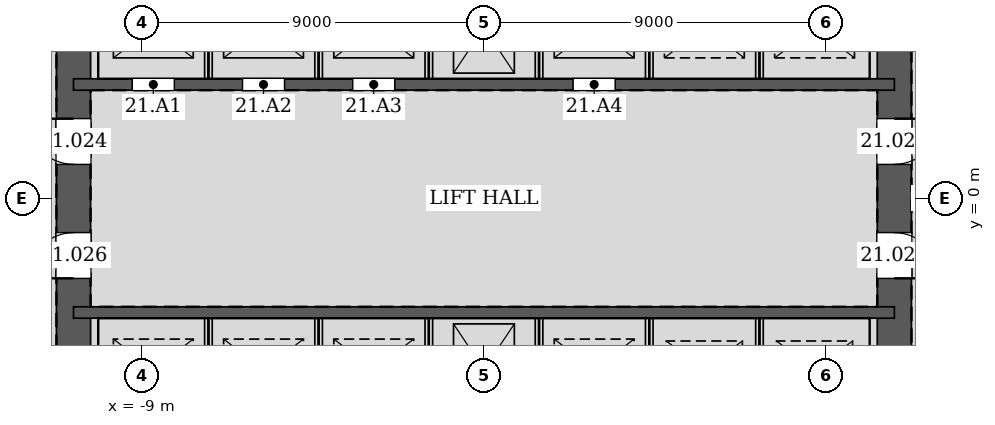
"""IFC4 building model, lengths in metres.
Left out: names, types, materials, properties, quantities, classifications, styles, units other than length and angle.
Written with IfcOpenShell. Run it as: python <this file> out.ifc"""

import sys

from ifc_helpers import new_model, si_unit, direction, frame, frame_2d, origin, place, context, subcontext, project, spatial, rectangle, extrude, element, fill, save


model = new_model("IFC4")
c1 = context("Model", 3, precision=1e-05, world=origin(), true_north=direction((0.0, 1.0)))
c2 = subcontext(c1, "Body", "Model", "MODEL_VIEW")
j1 = project(units=[si_unit("LENGTHUNIT", "METRE"), si_unit("PLANEANGLEUNIT", "RADIAN")], contexts=[c1])
p1 = place(None, origin())
s1 = spatial("IfcSite", under=j1, at=p1, CompositionType="ELEMENT")
p2 = place(p1, origin())
s2 = spatial("IfcBuilding", under=s1, at=p2, CompositionType="ELEMENT")
p3 = place(p2, frame((0.0, 0.0, 96.0)))
s3 = spatial("IfcBuildingStorey", under=s2, at=p3, CompositionType="ELEMENT", Elevation=96.0)
p4 = place(p3, frame((10.8, -10.8, 0.0), z_axis=(0.0, 0.0, 1.0), x_axis=(0.0, 1.0, 0.0)))
e1 = element("IfcWall", 1, at=p4, inside=s3, PredefinedType="SOLIDWALL", context=c2, shape_type="SweptSolid", body=[
    extrude(rectangle(XDim=21.6, YDim=0.9, at=frame_2d((10.8, 0.0))), origin(), (0.0, 0.0, 1.0), 4.2),
])
p5 = place(p4, frame((11.7, 0.0, 0.0)))
e2 = element("IfcOpeningElement", 2, at=p5, cuts=e1, PredefinedType="OPENING", context=c2, shape_type="SweptSolid", body=[
    extrude(rectangle(XDim=1.2, YDim=2.1, at=frame_2d((0.6, 1.05))), frame((0.0, 0.46, 0.0), z_axis=(0.0, -1.0, 0.0), x_axis=(1.0, 0.0, 0.0)), (0.0, 0.0, 1.0), 0.92),
])
p6 = place(p4, frame((8.7, 0.0, 0.0)))
e3 = element("IfcOpeningElement", 3, at=p6, cuts=e1, PredefinedType="OPENING", context=c2, shape_type="SweptSolid", body=[
    extrude(rectangle(XDim=1.2, YDim=2.1, at=frame_2d((0.6, 1.05))), frame((0.0, 0.46, 0.0), z_axis=(0.0, -1.0, 0.0), x_axis=(1.0, 0.0, 0.0)), (0.0, 0.0, 1.0), 0.92),
])
p7 = place(p3, frame((-10.8, 10.8, 0.0), z_axis=(0.0, 0.0, 1.0), x_axis=(0.0, -1.0, 0.0)))
e4 = element("IfcWall", 4, at=p7, inside=s3, PredefinedType="SOLIDWALL", context=c2, shape_type="SweptSolid", body=[
    extrude(rectangle(XDim=21.6, YDim=0.9, at=frame_2d((10.8, 0.0))), origin(), (0.0, 0.0, 1.0), 4.2),
])
p8 = place(p7, frame((8.7, 0.0, 0.0)))
e5 = element("IfcOpeningElement", 5, at=p8, cuts=e4, PredefinedType="OPENING", context=c2, shape_type="SweptSolid", body=[
    extrude(rectangle(XDim=1.2, YDim=2.1, at=frame_2d((0.6, 1.05))), frame((0.0, 0.46, 0.0), z_axis=(0.0, -1.0, 0.0), x_axis=(1.0, 0.0, 0.0)), (0.0, 0.0, 1.0), 0.92),
])
p9 = place(p7, frame((11.7, 0.0, 0.0)))
e6 = element("IfcOpeningElement", 6, at=p9, cuts=e4, PredefinedType="OPENING", context=c2, shape_type="SweptSolid", body=[
    extrude(rectangle(XDim=1.2, YDim=2.1, at=frame_2d((0.6, 1.05))), frame((0.0, 0.46, 0.0), z_axis=(0.0, -1.0, 0.0), x_axis=(1.0, 0.0, 0.0)), (0.0, 0.0, 1.0), 0.92),
])
p10 = place(p3, frame((-10.8, 3.0, 0.0), z_axis=(0.0, 0.0, 1.0), x_axis=(1.0, 0.0, 0.0)))
e7 = element("IfcWall", 7, at=p10, inside=s3, PredefinedType="SOLIDWALL", context=c2, shape_type="SweptSolid", body=[
    extrude(rectangle(XDim=21.6, YDim=0.3, at=frame_2d((10.8, 0.0))), origin(), (0.0, 0.0, 1.0), 4.2),
])
p11 = place(p10, frame((1.55, 0.0, 0.0)))
e8 = element("IfcOpeningElement", 8, at=p11, cuts=e7, PredefinedType="OPENING", context=c2, shape_type="SweptSolid", body=[
    extrude(rectangle(XDim=1.1, YDim=2.1, at=frame_2d((0.55, 1.05))), frame((0.0, 0.16, 0.0), z_axis=(0.0, -1.0, 0.0), x_axis=(1.0, 0.0, 0.0)), (0.0, 0.0, 1.0), 0.32),
])
p12 = place(p10, frame((4.45, 0.0, 0.0)))
e9 = element("IfcOpeningElement", 9, at=p12, cuts=e7, PredefinedType="OPENING", context=c2, shape_type="SweptSolid", body=[
    extrude(rectangle(XDim=1.1, YDim=2.1, at=frame_2d((0.55, 1.05))), frame((0.0, 0.16, 0.0), z_axis=(0.0, -1.0, 0.0), x_axis=(1.0, 0.0, 0.0)), (0.0, 0.0, 1.0), 0.32),
])
p13 = place(p10, frame((7.35, 0.0, 0.0)))
e10 = element("IfcOpeningElement", 10, at=p13, cuts=e7, PredefinedType="OPENING", context=c2, shape_type="SweptSolid", body=[
    extrude(rectangle(XDim=1.1, YDim=2.1, at=frame_2d((0.55, 1.05))), frame((0.0, 0.16, 0.0), z_axis=(0.0, -1.0, 0.0), x_axis=(1.0, 0.0, 0.0)), (0.0, 0.0, 1.0), 0.32),
])
p14 = place(p10, frame((13.15, 0.0, 0.0)))
e11 = element("IfcOpeningElement", 11, at=p14, cuts=e7, PredefinedType="OPENING", context=c2, shape_type="SweptSolid", body=[
    extrude(rectangle(XDim=1.1, YDim=2.1, at=frame_2d((0.55, 1.05))), frame((0.0, 0.16, 0.0), z_axis=(0.0, -1.0, 0.0), x_axis=(1.0, 0.0, 0.0)), (0.0, 0.0, 1.0), 0.32),
])
p15 = place(p3, frame((-10.8, -3.0, 0.0), z_axis=(0.0, 0.0, 1.0), x_axis=(1.0, 0.0, 0.0)))
e12 = element("IfcWall", 12, at=p15, inside=s3, PredefinedType="SOLIDWALL", context=c2, shape_type="SweptSolid", body=[
    extrude(rectangle(XDim=21.6, YDim=0.3, at=frame_2d((10.8, 0.0))), origin(), (0.0, 0.0, 1.0), 4.2),
])
for number, where, z_axis, x_axis in (
    (13, (-7.25, 3.15, 0.0), (0.0, 0.0, 1.0), (0.0, 1.0, 0.0)),
    (14, (-4.35, 3.15, 0.0), (0.0, 0.0, 1.0), (0.0, 1.0, 0.0)),
    (15, (-1.45, 3.15, 0.0), (0.0, 0.0, 1.0), (0.0, 1.0, 0.0)),
    (16, (1.45, 3.15, 0.0), (0.0, 0.0, 1.0), (0.0, 1.0, 0.0)),
    (17, (4.35, 3.15, 0.0), (0.0, 0.0, 1.0), (0.0, 1.0, 0.0)),
    (18, (7.25, 3.15, 0.0), (0.0, 0.0, 1.0), (0.0, 1.0, 0.0)),
    (19, (-7.25, -5.85, 0.0), (0.0, 0.0, 1.0), (0.0, 1.0, 0.0)),
    (20, (-4.35, -5.85, 0.0), (0.0, 0.0, 1.0), (0.0, 1.0, 0.0)),
    (21, (-1.45, -5.85, 0.0), (0.0, 0.0, 1.0), (0.0, 1.0, 0.0)),
    (22, (1.45, -5.85, 0.0), (0.0, 0.0, 1.0), (0.0, 1.0, 0.0)),
    (23, (4.35, -5.85, 0.0), (0.0, 0.0, 1.0), (0.0, 1.0, 0.0)),
    (24, (7.25, -5.85, 0.0), (0.0, 0.0, 1.0), (0.0, 1.0, 0.0)),
):
    element("IfcWall", number, at=place(p3, frame(where, z_axis=z_axis, x_axis=x_axis)), inside=s3, PredefinedType="PARTITIONING", context=c2, shape_type="SweptSolid", body=[
        extrude(rectangle(XDim=2.7, YDim=0.2, at=frame_2d((1.35, 0.0))), origin(), (0.0, 0.0, 1.0), 4.2),
    ])
p16 = place(p5, frame((1.2, 0.0, 0.0), z_axis=(0.0, 0.0, 1.0), x_axis=(-1.0, 0.0, 0.0)))
e25 = element("IfcDoor", 25, at=p16, inside=s3, OperationType="SINGLE_SWING_LEFT", PredefinedType="DOOR", context=c2, shape_type="SweptSolid", body=[
    extrude(rectangle(XDim=1.2, YDim=2.1, at=frame_2d((0.6, 1.05))), frame((0.0, 0.025, 0.0), z_axis=(0.0, -1.0, 0.0), x_axis=(1.0, 0.0, 0.0)), (0.0, 0.0, 1.0), 0.05),
])
fill(e2, e25)
p17 = place(p8, frame((1.2, 0.0, 0.0), z_axis=(0.0, 0.0, 1.0), x_axis=(-1.0, 0.0, 0.0)))
e26 = element("IfcDoor", 26, at=p17, inside=s3, OperationType="SINGLE_SWING_RIGHT", PredefinedType="DOOR", context=c2, shape_type="SweptSolid", body=[
    extrude(rectangle(XDim=1.2, YDim=2.1, at=frame_2d((0.6, 1.05))), frame((0.0, 0.025, 0.0), z_axis=(0.0, -1.0, 0.0), x_axis=(1.0, 0.0, 0.0)), (0.0, 0.0, 1.0), 0.05),
])
fill(e5, e26)
p18 = place(p6, frame((1.2, 0.0, 0.0), z_axis=(0.0, 0.0, 1.0), x_axis=(-1.0, 0.0, 0.0)))
e27 = element("IfcDoor", 27, at=p18, inside=s3, OperationType="SINGLE_SWING_RIGHT", PredefinedType="DOOR", context=c2, shape_type="SweptSolid", body=[
    extrude(rectangle(XDim=1.2, YDim=2.1, at=frame_2d((0.6, 1.05))), frame((0.0, 0.025, 0.0), z_axis=(0.0, -1.0, 0.0), x_axis=(1.0, 0.0, 0.0)), (0.0, 0.0, 1.0), 0.05),
])
fill(e3, e27)
p19 = place(p9, frame((1.2, 0.0, 0.0), z_axis=(0.0, 0.0, 1.0), x_axis=(-1.0, 0.0, 0.0)))
e28 = element("IfcDoor", 28, at=p19, inside=s3, OperationType="SINGLE_SWING_LEFT", PredefinedType="DOOR", context=c2, shape_type="SweptSolid", body=[
    extrude(rectangle(XDim=1.2, YDim=2.1, at=frame_2d((0.6, 1.05))), frame((0.0, 0.025, 0.0), z_axis=(0.0, -1.0, 0.0), x_axis=(1.0, 0.0, 0.0)), (0.0, 0.0, 1.0), 0.05),
])
fill(e6, e28)
p20 = place(p11, origin())
e29 = element("IfcDoor", 29, at=p20, inside=s3, OperationType="DOUBLE_DOOR_SLIDING", PredefinedType="DOOR", context=c2, shape_type="SweptSolid", body=[
    extrude(rectangle(XDim=1.1, YDim=2.1, at=frame_2d((0.55, 1.05))), frame((0.0, 0.025, 0.0), z_axis=(0.0, -1.0, 0.0), x_axis=(1.0, 0.0, 0.0)), (0.0, 0.0, 1.0), 0.05),
])
fill(e8, e29)
p21 = place(p12, origin())
e30 = element("IfcDoor", 30, at=p21, inside=s3, OperationType="DOUBLE_DOOR_SLIDING", PredefinedType="DOOR", context=c2, shape_type="SweptSolid", body=[
    extrude(rectangle(XDim=1.1, YDim=2.1, at=frame_2d((0.55, 1.05))), frame((0.0, 0.025, 0.0), z_axis=(0.0, -1.0, 0.0), x_axis=(1.0, 0.0, 0.0)), (0.0, 0.0, 1.0), 0.05),
])
fill(e9, e30)
p22 = place(p13, origin())
e31 = element("IfcDoor", 31, at=p22, inside=s3, OperationType="DOUBLE_DOOR_SLIDING", PredefinedType="DOOR", context=c2, shape_type="SweptSolid", body=[
    extrude(rectangle(XDim=1.1, YDim=2.1, at=frame_2d((0.55, 1.05))), frame((0.0, 0.025, 0.0), z_axis=(0.0, -1.0, 0.0), x_axis=(1.0, 0.0, 0.0)), (0.0, 0.0, 1.0), 0.05),
])
fill(e10, e31)
p23 = place(p14, origin())
e32 = element("IfcDoor", 32, at=p23, inside=s3, OperationType="DOUBLE_DOOR_SLIDING", PredefinedType="DOOR", context=c2, shape_type="SweptSolid", body=[
    extrude(rectangle(XDim=1.1, YDim=2.1, at=frame_2d((0.55, 1.05))), frame((0.0, 0.025, 0.0), z_axis=(0.0, -1.0, 0.0), x_axis=(1.0, 0.0, 0.0)), (0.0, 0.0, 1.0), 0.05),
])
fill(e11, e32)
save(model, sys.argv[1])
